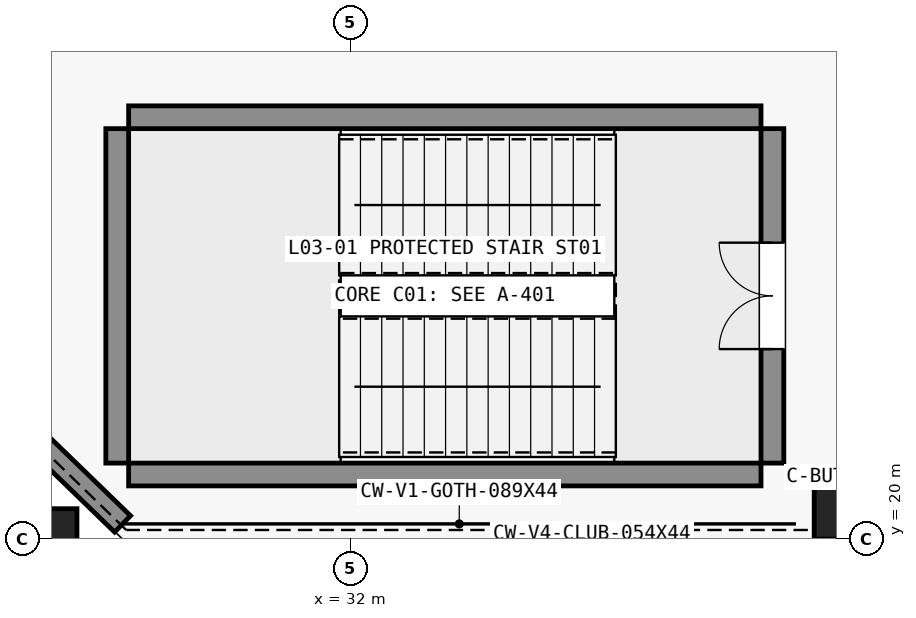
"""IFC4 building model, lengths in metres.
Left out: names, types, materials, properties, quantities, classifications, styles, units other than length and angle.
Written with IfcOpenShell. Run it as: python <this file> out.ifc"""

import sys

from ifc_helpers import new_model, si_unit, direction, frame, frame_2d, origin, origin_2d, place, context, subcontext, project, spatial, rectangle, extrude, element, fill, save


model = new_model("IFC4")
c1 = context("Model", 3, precision=1e-05, world=origin(), true_north=direction((0.0, 1.0)))
c2 = subcontext(c1, "Body", "Model", "MODEL_VIEW")
j1 = project(units=[si_unit("LENGTHUNIT", "METRE"), si_unit("PLANEANGLEUNIT", "RADIAN")], contexts=[c1])
p1 = place(None, origin())
s1 = spatial("IfcSite", under=j1, at=p1, CompositionType="ELEMENT")
p2 = place(p1, origin())
s2 = spatial("IfcBuilding", under=s1, at=p2, CompositionType="ELEMENT")
p3 = place(p2, frame((0.0, 0.0, 16.2)))
s3 = spatial("IfcBuildingStorey", under=s2, at=p3, CompositionType="ELEMENT", Elevation=16.2)
for number, where, z_axis, x_axis in (
    (1, (38.5, 20.4, 0.0), (0.0, 0.0, 1.0), (1.0, 0.0, 0.0)),
    (2, (28.0, 20.0, 0.0), (0.0, 0.0, 1.0), (1.0, 0.0, 0.0)),
):
    element("IfcColumn", number, at=place(p3, frame(where, z_axis=z_axis, x_axis=x_axis)), inside=s3, PredefinedType="PILASTER", context=c2, shape_type="SweptSolid", body=[
        extrude(rectangle(XDim=0.8, YDim=0.8, at=origin_2d()), origin(), (0.0, 0.0, 1.0), 4.8),
    ])
for number, where, z_axis, x_axis in (
    (3, (29.08, 20.85, 0.0), (0.0, 0.0, 1.0), (1.0, 0.0, 0.0)),
    (4, (29.08, 25.55, 0.0), (0.0, 0.0, 1.0), (1.0, 0.0, 0.0)),
):
    element("IfcWall", number, at=place(p3, frame(where, z_axis=z_axis, x_axis=x_axis)), inside=s3, PredefinedType="SHEAR", context=c2, shape_type="SweptSolid", body=[
        extrude(rectangle(XDim=8.32, YDim=0.3, at=frame_2d((4.16, 0.0))), origin(), (0.0, 0.0, 1.0), 4.8),
    ])
p4 = place(p3, frame((28.93, 21.0, 0.0), z_axis=(0.0, 0.0, 1.0), x_axis=(0.0, 1.0, 0.0)))
e5 = element("IfcWall", 5, at=p4, inside=s3, PredefinedType="SHEAR", context=c2, shape_type="SweptSolid", body=[
    extrude(rectangle(XDim=4.4, YDim=0.3, at=frame_2d((2.2, 0.0))), origin(), (0.0, 0.0, 1.0), 4.8),
])
p5 = place(p3, frame((37.55, 21.0, 0.0), z_axis=(0.0, 0.0, 1.0), x_axis=(0.0, 1.0, 0.0)))
e6 = element("IfcWall", 6, at=p5, inside=s3, PredefinedType="SHEAR", context=c2, shape_type="SweptSolid", body=[
    extrude(rectangle(XDim=4.4, YDim=0.3, at=frame_2d((2.2, 0.0))), origin(), (0.0, 0.0, 1.0), 4.8),
])
p6 = place(p5, frame((1.5, 0.0, 0.0)))
e7 = element("IfcOpeningElement", 7, at=p6, cuts=e6, PredefinedType="OPENING", context=c2, shape_type="SweptSolid", body=[
    extrude(rectangle(XDim=1.4, YDim=2.2, at=frame_2d((0.7, 1.1))), frame((0.0, 0.16, 0.0), z_axis=(0.0, -1.0, 0.0), x_axis=(1.0, 0.0, 0.0)), (0.0, 0.0, 1.0), 0.32),
])
p7 = place(p3, frame((16.2, 32.6, 0.0), z_axis=(0.0, 0.0, 1.0), x_axis=(0.718237441527, -0.695798086796, 0.0)))
e8 = element("IfcWall", 8, at=p7, inside=s3, PredefinedType="STANDARD", context=c2, shape_type="SweptSolid", body=[
    extrude(rectangle(XDim=17.822, YDim=0.3, at=frame_2d((8.911, 0.0))), origin(), (0.0, 0.0, 1.0), 2.39),
])
p8 = place(p6, origin())
e9 = element("IfcDoor", 9, at=p8, inside=s3, OperationType="DOUBLE_DOOR_SINGLE_SWING", PredefinedType="DOOR", context=c2, shape_type="SweptSolid", body=[
    extrude(rectangle(XDim=1.4, YDim=2.2, at=frame_2d((0.7, 1.1))), frame((0.0, 0.025, 0.0), z_axis=(0.0, -1.0, 0.0), x_axis=(1.0, 0.0, 0.0)), (0.0, 0.0, 1.0), 0.05),
])
fill(e7, e9)
save(model, sys.argv[1])
